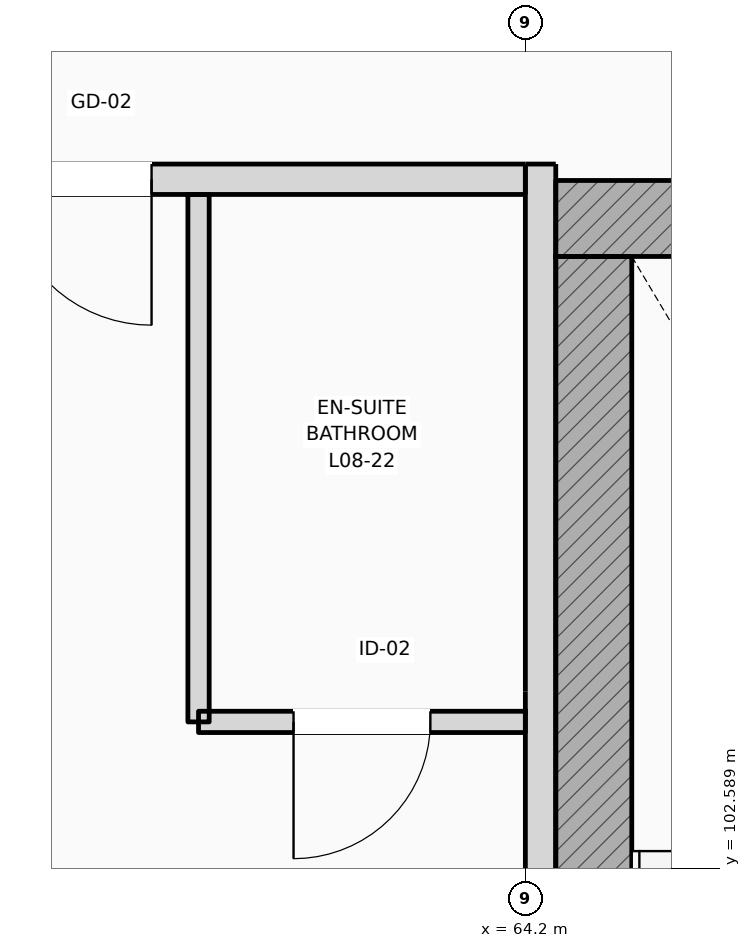
"""IFC4 building model, lengths in metres.
Left out: names, types, materials, properties, quantities, classifications, styles, units other than length and angle.
Written with IfcOpenShell. Run it as: python <this file> out.ifc"""

import sys

from ifc_helpers import new_model, si_unit, direction, frame, frame_2d, origin, place, context, subcontext, project, spatial, rectangle, extrude, element, fill, save


model = new_model("IFC4")
c1 = context("Model", 3, precision=1e-05, world=origin(), true_north=direction((0.0, 1.0)))
c2 = subcontext(c1, "Body", "Model", "MODEL_VIEW")
j1 = project(units=[si_unit("LENGTHUNIT", "METRE"), si_unit("PLANEANGLEUNIT", "RADIAN")], contexts=[c1])
p1 = place(None, origin())
s1 = spatial("IfcSite", under=j1, at=p1, CompositionType="ELEMENT")
p2 = place(p1, origin())
s2 = spatial("IfcBuilding", under=s1, at=p2, CompositionType="ELEMENT")
p3 = place(p2, frame((0.0, 0.0, 35.4)))
s3 = spatial("IfcBuildingStorey", under=s2, at=p3, CompositionType="ELEMENT", Elevation=35.4)
p4 = place(p3, frame((64.4, 106.862, 0.0), z_axis=(0.0, 0.0, 1.0), x_axis=(1.0, 0.0, 0.0)))
e1 = element("IfcWall", 1, at=p4, inside=s3, PredefinedType="SHEAR", context=c2, shape_type="SweptSolid", body=[
    extrude(rectangle(XDim=5.16, YDim=0.5, at=frame_2d((2.58, 0.0))), origin(), (0.0, 0.0, 1.0), 3.6),
])
p5 = place(p3, frame((64.65, 97.5, 0.0), z_axis=(0.0, 0.0, 1.0), x_axis=(0.0, 1.0, 0.0)))
e2 = element("IfcWall", 2, at=p5, inside=s3, PredefinedType="SHEAR", context=c2, shape_type="SweptSolid", body=[
    extrude(rectangle(XDim=9.112, YDim=0.5, at=frame_2d((4.556, 0.0))), origin(), (0.0, 0.0, 1.0), 3.6),
])
p6 = place(p3, frame((40.76, 107.12, 0.0), z_axis=(0.0, 0.0, 1.0), x_axis=(1.0, 0.0, 0.0)))
e3 = element("IfcWall", 3, at=p6, inside=s3, PredefinedType="PARTITIONING", context=c2, shape_type="SweptSolid", body=[
    extrude(rectangle(XDim=23.44, YDim=0.2, at=frame_2d((11.72, 0.0))), origin(), (0.0, 0.0, 1.0), 3.38),
])
p7 = place(p6, frame((2.629, 0.0, 0.0)))
e4 = element("IfcOpeningElement", 4, at=p7, cuts=e3, PredefinedType="OPENING", context=c2, shape_type="SweptSolid", body=[
    extrude(rectangle(XDim=0.96, YDim=2.2, at=frame_2d((0.48, 1.1))), frame((0.0, 0.11, 0.0), z_axis=(0.0, -1.0, 0.0), x_axis=(1.0, 0.0, 0.0)), (0.0, 0.0, 1.0), 0.22),
])
p8 = place(p6, frame((4.343, 0.0, 0.0)))
e5 = element("IfcOpeningElement", 5, at=p8, cuts=e3, PredefinedType="OPENING", context=c2, shape_type="SweptSolid", body=[
    extrude(rectangle(XDim=0.96, YDim=2.2, at=frame_2d((0.48, 1.1))), frame((0.0, 0.11, 0.0), z_axis=(0.0, -1.0, 0.0), x_axis=(1.0, 0.0, 0.0)), (0.0, 0.0, 1.0), 0.22),
])
p9 = place(p6, frame((10.401, 0.0, 0.0)))
e6 = element("IfcOpeningElement", 6, at=p9, cuts=e3, PredefinedType="OPENING", context=c2, shape_type="SweptSolid", body=[
    extrude(rectangle(XDim=0.96, YDim=2.2, at=frame_2d((0.48, 1.1))), frame((0.0, 0.11, 0.0), z_axis=(0.0, -1.0, 0.0), x_axis=(1.0, 0.0, 0.0)), (0.0, 0.0, 1.0), 0.22),
])
p10 = place(p6, frame((12.159, 0.0, 0.0)))
e7 = element("IfcOpeningElement", 7, at=p10, cuts=e3, PredefinedType="OPENING", context=c2, shape_type="SweptSolid", body=[
    extrude(rectangle(XDim=0.96, YDim=2.2, at=frame_2d((0.48, 1.1))), frame((0.0, 0.11, 0.0), z_axis=(0.0, -1.0, 0.0), x_axis=(1.0, 0.0, 0.0)), (0.0, 0.0, 1.0), 0.22),
])
p11 = place(p6, frame((18.218, 0.0, 0.0)))
e8 = element("IfcOpeningElement", 8, at=p11, cuts=e3, PredefinedType="OPENING", context=c2, shape_type="SweptSolid", body=[
    extrude(rectangle(XDim=0.96, YDim=2.2, at=frame_2d((0.48, 1.1))), frame((0.0, 0.11, 0.0), z_axis=(0.0, -1.0, 0.0), x_axis=(1.0, 0.0, 0.0)), (0.0, 0.0, 1.0), 0.22),
])
p12 = place(p6, frame((20.021, 0.0, 0.0)))
e9 = element("IfcOpeningElement", 9, at=p12, cuts=e3, PredefinedType="OPENING", context=c2, shape_type="SweptSolid", body=[
    extrude(rectangle(XDim=0.96, YDim=2.2, at=frame_2d((0.48, 1.1))), frame((0.0, 0.11, 0.0), z_axis=(0.0, -1.0, 0.0), x_axis=(1.0, 0.0, 0.0)), (0.0, 0.0, 1.0), 0.22),
])
p13 = place(p3, frame((64.3, 96.14, 0.0), z_axis=(0.0, 0.0, 1.0), x_axis=(0.0, 1.0, 0.0)))
e10 = element("IfcWall", 10, at=p13, inside=s3, PredefinedType="PARTITIONING", context=c2, shape_type="SweptSolid", body=[
    extrude(rectangle(XDim=11.08, YDim=0.2, at=frame_2d((5.54, 0.0))), origin(), (0.0, 0.0, 1.0), 3.01),
])
p14 = place(p3, frame((62.05, 103.55, 0.0), z_axis=(0.0, 0.0, 1.0), x_axis=(0.0, 1.0, 0.0)))
e11 = element("IfcWall", 11, at=p14, inside=s3, PredefinedType="PARTITIONING", context=c2, shape_type="SweptSolid", body=[
    extrude(rectangle(XDim=3.47, YDim=0.14, at=frame_2d((1.735, 0.0))), origin(), (0.0, 0.0, 1.0), 3.38),
])
p15 = place(p3, frame((62.05, 103.55, 0.0), z_axis=(0.0, 0.0, 1.0), x_axis=(1.0, 0.0, 0.0)))
e12 = element("IfcWall", 12, at=p15, inside=s3, PredefinedType="PARTITIONING", context=c2, shape_type="SweptSolid", body=[
    extrude(rectangle(XDim=2.15, YDim=0.14, at=frame_2d((1.075, 0.0))), origin(), (0.0, 0.0, 1.0), 3.38),
])
p16 = place(p15, frame((0.625, 0.0, 0.0)))
e13 = element("IfcOpeningElement", 13, at=p16, cuts=e12, PredefinedType="OPENING", context=c2, shape_type="SweptSolid", body=[
    extrude(rectangle(XDim=0.9, YDim=2.1, at=frame_2d((0.45, 1.05))), frame((0.0, 0.08, 0.0), z_axis=(0.0, -1.0, 0.0), x_axis=(1.0, 0.0, 0.0)), (0.0, 0.0, 1.0), 0.16),
])
p17 = place(p12, frame((0.96, 0.0, 0.0), z_axis=(0.0, 0.0, 1.0), x_axis=(-1.0, 0.0, 0.0)))
e14 = element("IfcDoor", 14, at=p17, inside=s3, OperationType="SINGLE_SWING_RIGHT", PredefinedType="DOOR", context=c2, shape_type="SweptSolid", body=[
    extrude(rectangle(XDim=0.96, YDim=2.2, at=frame_2d((0.48, 1.1))), frame((0.0, 0.025, 0.0), z_axis=(0.0, -1.0, 0.0), x_axis=(1.0, 0.0, 0.0)), (0.0, 0.0, 1.0), 0.05),
])
fill(e9, e14)
p18 = place(p16, frame((0.9, 0.0, 0.0), z_axis=(0.0, 0.0, 1.0), x_axis=(-1.0, 0.0, 0.0)))
e15 = element("IfcDoor", 15, at=p18, inside=s3, OperationType="SINGLE_SWING_LEFT", PredefinedType="DOOR", context=c2, shape_type="SweptSolid", body=[
    extrude(rectangle(XDim=0.9, YDim=2.1, at=frame_2d((0.45, 1.05))), frame((0.0, 0.025, 0.0), z_axis=(0.0, -1.0, 0.0), x_axis=(1.0, 0.0, 0.0)), (0.0, 0.0, 1.0), 0.05),
])
fill(e13, e15)
save(model, sys.argv[1])
